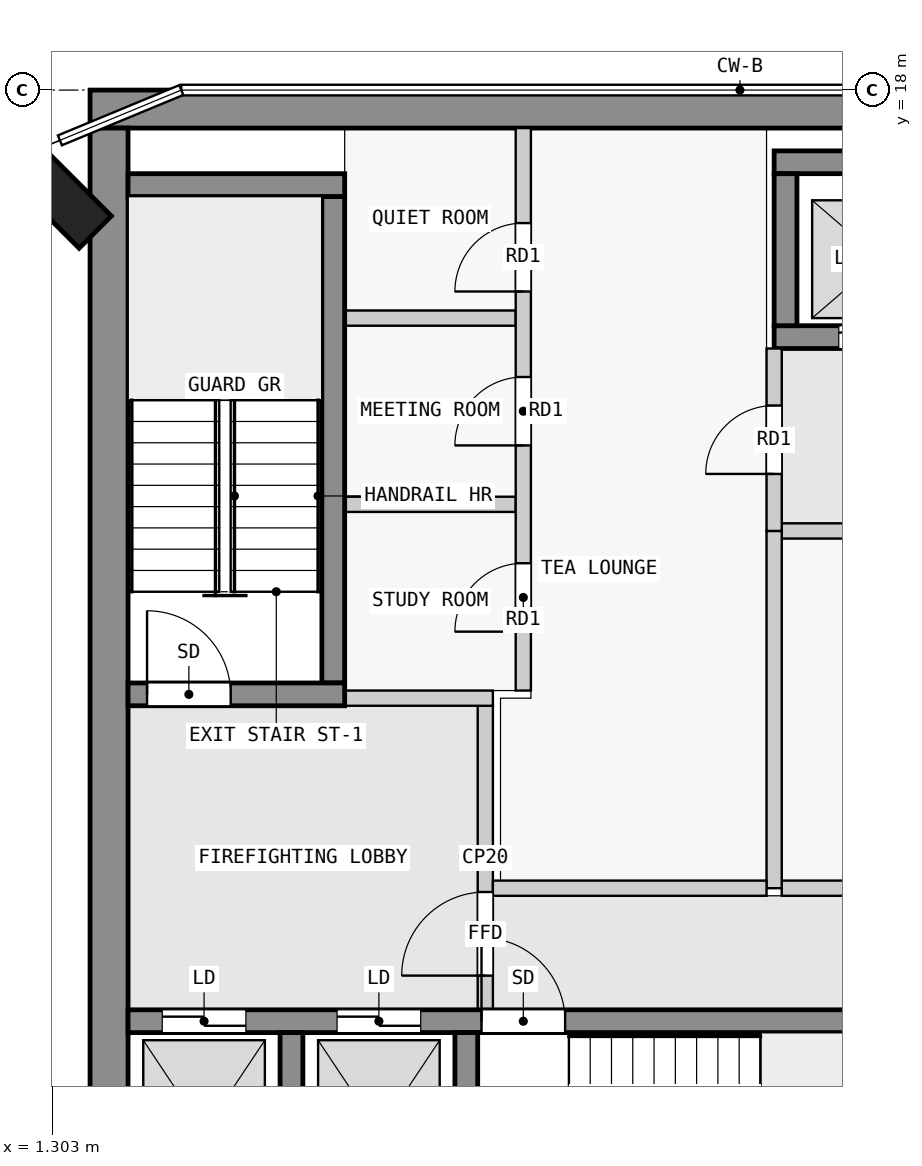
"""IFC4 building model, lengths in metres.
Left out: names, types, materials, properties, quantities, classifications, styles, units other than length and angle.
Written with IfcOpenShell. Run it as: python <this file> out.ifc"""

import sys

from ifc_helpers import new_model, si_unit, direction, frame, frame_2d, origin, origin_2d, place, context, subcontext, project, spatial, rectangle, extrude, element, fill, save


model = new_model("IFC4")
c1 = context("Model", 3, precision=1e-05, world=origin(), true_north=direction((0.0, 1.0)))
c2 = subcontext(c1, "Body", "Model", "MODEL_VIEW")
j1 = project(units=[si_unit("LENGTHUNIT", "METRE"), si_unit("PLANEANGLEUNIT", "RADIAN")], contexts=[c1])
p1 = place(None, origin())
s1 = spatial("IfcSite", under=j1, at=p1, CompositionType="ELEMENT")
p2 = place(p1, origin())
s2 = spatial("IfcBuilding", under=s1, at=p2, CompositionType="ELEMENT")
p3 = place(p2, frame((0.0, 0.0, 242.4)))
s3 = spatial("IfcBuildingStorey", under=s2, at=p3, CompositionType="ELEMENT", Elevation=242.4)
p4 = place(p3, frame((1.374, 16.626, 0.0), z_axis=(0.0, 0.0, 1.0), x_axis=(0.707106781187, 0.707106781187, 0.0)))
e1 = element("IfcColumn", 1, at=p4, inside=s3, PredefinedType="COLUMN", context=c2, shape_type="SweptSolid", body=[
    extrude(rectangle(XDim=0.6, YDim=1.4, at=origin_2d()), origin(), (0.0, 0.0, 1.0), 3.5),
])
p5 = place(p3, frame((1.8, 17.75, 0.0), z_axis=(0.0, 0.0, 1.0), x_axis=(1.0, 0.0, 0.0)))
e2 = element("IfcWall", 2, at=p5, inside=s3, PredefinedType="SHEAR", context=c2, shape_type="SweptSolid", body=[
    extrude(rectangle(XDim=20.7, YDim=0.5, at=frame_2d((10.35, 0.0))), origin(), (0.0, 0.0, 1.0), 3.25),
])
p6 = place(p3, frame((2.05, 2.5, 0.0), z_axis=(0.0, 0.0, 1.0), x_axis=(0.0, 1.0, 0.0)))
e3 = element("IfcWall", 3, at=p6, inside=s3, PredefinedType="SHEAR", context=c2, shape_type="SweptSolid", body=[
    extrude(rectangle(XDim=15.0, YDim=0.5, at=frame_2d((7.5, 0.0))), origin(), (0.0, 0.0, 1.0), 3.25),
])
for number, where, z_axis, x_axis in (
    (4, (4.45, 2.8, 0.0), (0.0, 0.0, 1.0), (0.0, 1.0, 0.0)),
    (5, (6.75, 2.8, 0.0), (0.0, 0.0, 1.0), (0.0, 1.0, 0.0)),
):
    element("IfcWall", number, at=place(p3, frame(where, z_axis=z_axis, x_axis=x_axis)), inside=s3, PredefinedType="SHEAR", context=c2, shape_type="SweptSolid", body=[
        extrude(rectangle(XDim=2.8, YDim=0.3, at=frame_2d((1.4, 0.0))), origin(), (0.0, 0.0, 1.0), 3.25),
    ])
p7 = place(p3, frame((2.3, 5.75, 0.0), z_axis=(0.0, 0.0, 1.0), x_axis=(1.0, 0.0, 0.0)))
e6 = element("IfcWall", 6, at=p7, inside=s3, PredefinedType="SHEAR", context=c2, shape_type="SweptSolid", body=[
    extrude(rectangle(XDim=18.8, YDim=0.3, at=frame_2d((9.4, 0.0))), origin(), (0.0, 0.0, 1.0), 3.25),
])
p8 = place(p7, frame((4.65, 0.0, 0.0)))
e7 = element("IfcOpeningElement", 7, at=p8, cuts=e6, PredefinedType="OPENING", context=c2, shape_type="SweptSolid", body=[
    extrude(rectangle(XDim=1.1, YDim=2.1, at=frame_2d((0.55, 1.05))), frame((0.0, 0.16, 0.0), z_axis=(0.0, -1.0, 0.0), x_axis=(1.0, 0.0, 0.0)), (0.0, 0.0, 1.0), 0.32),
])
p9 = place(p7, frame((0.45, 0.0, 0.0)))
e8 = element("IfcOpeningElement", 8, at=p9, cuts=e6, PredefinedType="OPENING", context=c2, shape_type="SweptSolid", body=[
    extrude(rectangle(XDim=1.1, YDim=2.1, at=frame_2d((0.55, 1.05))), frame((0.0, 0.16, 0.0), z_axis=(0.0, -1.0, 0.0), x_axis=(1.0, 0.0, 0.0)), (0.0, 0.0, 1.0), 0.32),
])
p10 = place(p7, frame((2.75, 0.0, 0.0)))
e9 = element("IfcOpeningElement", 9, at=p10, cuts=e6, PredefinedType="OPENING", context=c2, shape_type="SweptSolid", body=[
    extrude(rectangle(XDim=1.1, YDim=2.1, at=frame_2d((0.55, 1.05))), frame((0.0, 0.16, 0.0), z_axis=(0.0, -1.0, 0.0), x_axis=(1.0, 0.0, 0.0)), (0.0, 0.0, 1.0), 0.32),
])
p11 = place(p7, frame((13.2, 0.0, 0.0)))
e10 = element("IfcOpeningElement", 10, at=p11, cuts=e6, PredefinedType="OPENING", context=c2, shape_type="SweptSolid", body=[
    extrude(rectangle(XDim=0.9, YDim=2.1, at=frame_2d((0.45, 1.05))), frame((0.0, 0.16, 0.0), z_axis=(0.0, -1.0, 0.0), x_axis=(1.0, 0.0, 0.0)), (0.0, 0.0, 1.0), 0.32),
])
p12 = place(p7, frame((16.95, 0.0, 0.0)))
e11 = element("IfcOpeningElement", 11, at=p12, cuts=e6, PredefinedType="OPENING", context=c2, shape_type="SweptSolid", body=[
    extrude(rectangle(XDim=0.9, YDim=2.1, at=frame_2d((0.45, 1.05))), frame((0.0, 0.16, 0.0), z_axis=(0.0, -1.0, 0.0), x_axis=(1.0, 0.0, 0.0)), (0.0, 0.0, 1.0), 0.32),
])
p13 = place(p3, frame((2.3, 10.05, 0.0), z_axis=(0.0, 0.0, 1.0), x_axis=(1.0, 0.0, 0.0)))
e12 = element("IfcWall", 12, at=p13, inside=s3, PredefinedType="SHEAR", context=c2, shape_type="SweptSolid", body=[
    extrude(rectangle(XDim=2.85, YDim=0.3, at=frame_2d((1.425, 0.0))), origin(), (0.0, 0.0, 1.0), 3.25),
])
p14 = place(p13, frame((0.25, 0.0, 0.0)))
e13 = element("IfcOpeningElement", 13, at=p14, cuts=e12, PredefinedType="OPENING", context=c2, shape_type="SweptSolid", body=[
    extrude(rectangle(XDim=1.1, YDim=2.1, at=frame_2d((0.55, 1.05))), frame((0.0, 0.16, 0.0), z_axis=(0.0, -1.0, 0.0), x_axis=(1.0, 0.0, 0.0)), (0.0, 0.0, 1.0), 0.32),
])
p15 = place(p3, frame((5.0, 10.2, 0.0), z_axis=(0.0, 0.0, 1.0), x_axis=(0.0, 1.0, 0.0)))
e14 = element("IfcWall", 14, at=p15, inside=s3, PredefinedType="SHEAR", context=c2, shape_type="SweptSolid", body=[
    extrude(rectangle(XDim=6.4, YDim=0.3, at=frame_2d((3.2, 0.0))), origin(), (0.0, 0.0, 1.0), 3.25),
])
p16 = place(p3, frame((2.3, 16.75, 0.0), z_axis=(0.0, 0.0, 1.0), x_axis=(1.0, 0.0, 0.0)))
e15 = element("IfcWall", 15, at=p16, inside=s3, PredefinedType="SHEAR", context=c2, shape_type="SweptSolid", body=[
    extrude(rectangle(XDim=2.85, YDim=0.3, at=frame_2d((1.425, 0.0))), origin(), (0.0, 0.0, 1.0), 3.25),
])
p17 = place(p3, frame((10.8, 17.05, 0.0), z_axis=(0.0, 0.0, 1.0), x_axis=(1.0, 0.0, 0.0)))
e16 = element("IfcWall", 16, at=p17, inside=s3, PredefinedType="SHEAR", context=c2, shape_type="SweptSolid", body=[
    extrude(rectangle(XDim=7.8, YDim=0.3, at=frame_2d((3.9, 0.0))), origin(), (0.0, 0.0, 1.0), 3.25),
])
p18 = place(p3, frame((10.8, 14.75, 0.0), z_axis=(0.0, 0.0, 1.0), x_axis=(1.0, 0.0, 0.0)))
e17 = element("IfcWall", 17, at=p18, inside=s3, PredefinedType="SHEAR", context=c2, shape_type="SweptSolid", body=[
    extrude(rectangle(XDim=7.8, YDim=0.3, at=frame_2d((3.9, 0.0))), origin(), (0.0, 0.0, 1.0), 3.25),
])
p19 = place(p18, frame((0.85, 0.0, 0.0)))
e18 = element("IfcOpeningElement", 18, at=p19, cuts=e17, PredefinedType="OPENING", context=c2, shape_type="SweptSolid", body=[
    extrude(rectangle(XDim=1.1, YDim=2.1, at=frame_2d((0.55, 1.05))), frame((0.0, 0.16, 0.0), z_axis=(0.0, -1.0, 0.0), x_axis=(1.0, 0.0, 0.0)), (0.0, 0.0, 1.0), 0.32),
])
p20 = place(p18, frame((3.35, 0.0, 0.0)))
e19 = element("IfcOpeningElement", 19, at=p20, cuts=e17, PredefinedType="OPENING", context=c2, shape_type="SweptSolid", body=[
    extrude(rectangle(XDim=1.1, YDim=2.1, at=frame_2d((0.55, 1.05))), frame((0.0, 0.16, 0.0), z_axis=(0.0, -1.0, 0.0), x_axis=(1.0, 0.0, 0.0)), (0.0, 0.0, 1.0), 0.32),
])
p21 = place(p18, frame((5.85, 0.0, 0.0)))
e20 = element("IfcOpeningElement", 20, at=p21, cuts=e17, PredefinedType="OPENING", context=c2, shape_type="SweptSolid", body=[
    extrude(rectangle(XDim=1.1, YDim=2.1, at=frame_2d((0.55, 1.05))), frame((0.0, 0.16, 0.0), z_axis=(0.0, -1.0, 0.0), x_axis=(1.0, 0.0, 0.0)), (0.0, 0.0, 1.0), 0.32),
])
p22 = place(p3, frame((10.95, 14.9, 0.0), z_axis=(0.0, 0.0, 1.0), x_axis=(0.0, 1.0, 0.0)))
e21 = element("IfcWall", 21, at=p22, inside=s3, PredefinedType="SHEAR", context=c2, shape_type="SweptSolid", body=[
    extrude(rectangle(XDim=2.0, YDim=0.3, at=frame_2d((1.0, 0.0))), origin(), (0.0, 0.0, 1.0), 3.25),
])
p23 = place(p3, frame((7.0, 5.9, 0.0), z_axis=(0.0, 0.0, 1.0), x_axis=(0.0, 1.0, 0.0)))
e22 = element("IfcWall", 22, at=p23, inside=s3, PredefinedType="PARTITIONING", context=c2, shape_type="SweptSolid", body=[
    extrude(rectangle(XDim=4.0, YDim=0.2, at=frame_2d((2.0, 0.0))), origin(), (0.0, 0.0, 1.0), 3.25),
])
p24 = place(p23, frame((0.45, 0.0, 0.0)))
e23 = element("IfcOpeningElement", 23, at=p24, cuts=e22, PredefinedType="OPENING", context=c2, shape_type="SweptSolid", body=[
    extrude(rectangle(XDim=1.1, YDim=2.1, at=frame_2d((0.55, 1.05))), frame((0.0, 0.11, 0.0), z_axis=(0.0, -1.0, 0.0), x_axis=(1.0, 0.0, 0.0)), (0.0, 0.0, 1.0), 0.22),
])
p25 = place(p3, frame((5.15, 10.0, 0.0), z_axis=(0.0, 0.0, 1.0), x_axis=(1.0, 0.0, 0.0)))
e24 = element("IfcWall", 24, at=p25, inside=s3, PredefinedType="PARTITIONING", context=c2, shape_type="SweptSolid", body=[
    extrude(rectangle(XDim=1.95, YDim=0.2, at=frame_2d((0.975, 0.0))), origin(), (0.0, 0.0, 1.0), 3.25),
])
p26 = place(p3, frame((7.1, 7.5, 0.0), z_axis=(0.0, 0.0, 1.0), x_axis=(1.0, 0.0, 0.0)))
e25 = element("IfcWall", 25, at=p26, inside=s3, PredefinedType="PARTITIONING", context=c2, shape_type="SweptSolid", body=[
    extrude(rectangle(XDim=3.6, YDim=0.2, at=frame_2d((1.8, 0.0))), origin(), (0.0, 0.0, 1.0), 3.25),
])
p27 = place(p3, frame((10.8, 12.2, 0.0), z_axis=(0.0, 0.0, 1.0), x_axis=(0.0, 1.0, 0.0)))
e26 = element("IfcWall", 26, at=p27, inside=s3, PredefinedType="PARTITIONING", context=c2, shape_type="SweptSolid", body=[
    extrude(rectangle(XDim=2.4, YDim=0.2, at=frame_2d((1.2, 0.0))), origin(), (0.0, 0.0, 1.0), 3.25),
])
p28 = place(p27, frame((0.75, 0.0, 0.0)))
e27 = element("IfcOpeningElement", 27, at=p28, cuts=e26, PredefinedType="OPENING", context=c2, shape_type="SweptSolid", body=[
    extrude(rectangle(XDim=0.9, YDim=2.1, at=frame_2d((0.45, 1.05))), frame((0.0, 0.11, 0.0), z_axis=(0.0, -1.0, 0.0), x_axis=(1.0, 0.0, 0.0)), (0.0, 0.0, 1.0), 0.22),
])
p29 = place(p3, frame((10.8, 7.5, 0.0), z_axis=(0.0, 0.0, 1.0), x_axis=(0.0, 1.0, 0.0)))
e28 = element("IfcWall", 28, at=p29, inside=s3, PredefinedType="PARTITIONING", context=c2, shape_type="SweptSolid", body=[
    extrude(rectangle(XDim=4.7, YDim=0.2, at=frame_2d((2.35, 0.0))), origin(), (0.0, 0.0, 1.0), 3.25),
])
p30 = place(p3, frame((10.9, 7.5, 0.0), z_axis=(0.0, 0.0, 1.0), x_axis=(1.0, 0.0, 0.0)))
e29 = element("IfcWall", 29, at=p30, inside=s3, PredefinedType="PARTITIONING", context=c2, shape_type="SweptSolid", body=[
    extrude(rectangle(XDim=8.6, YDim=0.2, at=frame_2d((4.3, 0.0))), origin(), (0.0, 0.0, 1.0), 3.25),
])
p31 = place(p3, frame((10.9, 12.2, 0.0), z_axis=(0.0, 0.0, 1.0), x_axis=(1.0, 0.0, 0.0)))
e30 = element("IfcWall", 30, at=p31, inside=s3, PredefinedType="PARTITIONING", context=c2, shape_type="SweptSolid", body=[
    extrude(rectangle(XDim=8.6, YDim=0.2, at=frame_2d((4.3, 0.0))), origin(), (0.0, 0.0, 1.0), 3.25),
])
p32 = place(p31, frame((3.85, 0.0, 0.0)))
e31 = element("IfcOpeningElement", 31, at=p32, cuts=e30, PredefinedType="OPENING", context=c2, shape_type="SweptSolid", body=[
    extrude(rectangle(XDim=0.9, YDim=2.1, at=frame_2d((0.45, 1.05))), frame((0.0, 0.11, 0.0), z_axis=(0.0, -1.0, 0.0), x_axis=(1.0, 0.0, 0.0)), (0.0, 0.0, 1.0), 0.22),
])
p33 = place(p3, frame((7.5, 10.1, 0.0), z_axis=(0.0, 0.0, 1.0), x_axis=(0.0, 1.0, 0.0)))
e32 = element("IfcWall", 32, at=p33, inside=s3, PredefinedType="PARTITIONING", context=c2, shape_type="SweptSolid", body=[
    extrude(rectangle(XDim=7.4, YDim=0.2, at=frame_2d((3.7, 0.0))), origin(), (0.0, 0.0, 1.0), 3.25),
])
p34 = place(p33, frame((0.775, 0.0, 0.0)))
e33 = element("IfcOpeningElement", 33, at=p34, cuts=e32, PredefinedType="OPENING", context=c2, shape_type="SweptSolid", body=[
    extrude(rectangle(XDim=0.9, YDim=2.1, at=frame_2d((0.45, 1.05))), frame((0.0, 0.11, 0.0), z_axis=(0.0, -1.0, 0.0), x_axis=(1.0, 0.0, 0.0)), (0.0, 0.0, 1.0), 0.22),
])
p35 = place(p33, frame((3.225, 0.0, 0.0)))
e34 = element("IfcOpeningElement", 34, at=p35, cuts=e32, PredefinedType="OPENING", context=c2, shape_type="SweptSolid", body=[
    extrude(rectangle(XDim=0.9, YDim=2.1, at=frame_2d((0.45, 1.05))), frame((0.0, 0.11, 0.0), z_axis=(0.0, -1.0, 0.0), x_axis=(1.0, 0.0, 0.0)), (0.0, 0.0, 1.0), 0.22),
])
p36 = place(p33, frame((5.25, 0.0, 0.0)))
e35 = element("IfcOpeningElement", 35, at=p36, cuts=e32, PredefinedType="OPENING", context=c2, shape_type="SweptSolid", body=[
    extrude(rectangle(XDim=0.9, YDim=2.1, at=frame_2d((0.45, 1.05))), frame((0.0, 0.11, 0.0), z_axis=(0.0, -1.0, 0.0), x_axis=(1.0, 0.0, 0.0)), (0.0, 0.0, 1.0), 0.22),
])
for number, where, z_axis, x_axis in (
    (36, (5.15, 12.55, 0.0), (0.0, 0.0, 1.0), (1.0, 0.0, 0.0)),
    (37, (5.15, 15.0, 0.0), (0.0, 0.0, 1.0), (1.0, 0.0, 0.0)),
):
    element("IfcWall", number, at=place(p3, frame(where, z_axis=z_axis, x_axis=x_axis)), inside=s3, PredefinedType="PARTITIONING", context=c2, shape_type="SweptSolid", body=[
        extrude(rectangle(XDim=2.25, YDim=0.2, at=frame_2d((1.125, 0.0))), origin(), (0.0, 0.0, 1.0), 3.25),
    ])
p37 = place(p24, origin())
e38 = element("IfcDoor", 38, at=p37, inside=s3, OperationType="SINGLE_SWING_LEFT", PredefinedType="DOOR", context=c2, shape_type="SweptSolid", body=[
    extrude(rectangle(XDim=1.1, YDim=2.1, at=frame_2d((0.55, 1.05))), frame((0.0, 0.025, 0.0), z_axis=(0.0, -1.0, 0.0), x_axis=(1.0, 0.0, 0.0)), (0.0, 0.0, 1.0), 0.05),
])
fill(e23, e38)
p38 = place(p14, origin())
e39 = element("IfcDoor", 39, at=p38, inside=s3, OperationType="SINGLE_SWING_RIGHT", PredefinedType="DOOR", context=c2, shape_type="SweptSolid", body=[
    extrude(rectangle(XDim=1.1, YDim=2.1, at=frame_2d((0.55, 1.05))), frame((0.0, 0.025, 0.0), z_axis=(0.0, -1.0, 0.0), x_axis=(1.0, 0.0, 0.0)), (0.0, 0.0, 1.0), 0.05),
])
fill(e13, e39)
p39 = place(p28, origin())
e40 = element("IfcDoor", 40, at=p39, inside=s3, OperationType="SINGLE_SWING_LEFT", PredefinedType="DOOR", context=c2, shape_type="SweptSolid", body=[
    extrude(rectangle(XDim=0.9, YDim=2.1, at=frame_2d((0.45, 1.05))), frame((0.0, 0.025, 0.0), z_axis=(0.0, -1.0, 0.0), x_axis=(1.0, 0.0, 0.0)), (0.0, 0.0, 1.0), 0.05),
])
fill(e27, e40)
p40 = place(p8, origin())
e41 = element("IfcDoor", 41, at=p40, inside=s3, OperationType="SINGLE_SWING_LEFT", PredefinedType="DOOR", context=c2, shape_type="SweptSolid", body=[
    extrude(rectangle(XDim=1.1, YDim=2.1, at=frame_2d((0.55, 1.05))), frame((0.0, 0.025, 0.0), z_axis=(0.0, -1.0, 0.0), x_axis=(1.0, 0.0, 0.0)), (0.0, 0.0, 1.0), 0.05),
])
fill(e7, e41)
p41 = place(p9, origin())
e42 = element("IfcDoor", 42, at=p41, inside=s3, OperationType="DOUBLE_DOOR_SLIDING", PredefinedType="DOOR", context=c2, shape_type="SweptSolid", body=[
    extrude(rectangle(XDim=1.1, YDim=2.1, at=frame_2d((0.55, 1.05))), frame((0.0, 0.025, 0.0), z_axis=(0.0, -1.0, 0.0), x_axis=(1.0, 0.0, 0.0)), (0.0, 0.0, 1.0), 0.05),
])
fill(e8, e42)
p42 = place(p10, origin())
e43 = element("IfcDoor", 43, at=p42, inside=s3, OperationType="DOUBLE_DOOR_SLIDING", PredefinedType="DOOR", context=c2, shape_type="SweptSolid", body=[
    extrude(rectangle(XDim=1.1, YDim=2.1, at=frame_2d((0.55, 1.05))), frame((0.0, 0.025, 0.0), z_axis=(0.0, -1.0, 0.0), x_axis=(1.0, 0.0, 0.0)), (0.0, 0.0, 1.0), 0.05),
])
fill(e9, e43)
p43 = place(p19, origin())
e44 = element("IfcDoor", 44, at=p43, inside=s3, OperationType="DOUBLE_DOOR_SLIDING", PredefinedType="DOOR", context=c2, shape_type="SweptSolid", body=[
    extrude(rectangle(XDim=1.1, YDim=2.1, at=frame_2d((0.55, 1.05))), frame((0.0, 0.025, 0.0), z_axis=(0.0, -1.0, 0.0), x_axis=(1.0, 0.0, 0.0)), (0.0, 0.0, 1.0), 0.05),
])
fill(e18, e44)
p44 = place(p34, origin())
e45 = element("IfcDoor", 45, at=p44, inside=s3, OperationType="SINGLE_SWING_RIGHT", PredefinedType="DOOR", context=c2, shape_type="SweptSolid", body=[
    extrude(rectangle(XDim=0.9, YDim=2.1, at=frame_2d((0.45, 1.05))), frame((0.0, 0.025, 0.0), z_axis=(0.0, -1.0, 0.0), x_axis=(1.0, 0.0, 0.0)), (0.0, 0.0, 1.0), 0.05),
])
fill(e33, e45)
p45 = place(p35, origin())
e46 = element("IfcDoor", 46, at=p45, inside=s3, OperationType="SINGLE_SWING_RIGHT", PredefinedType="DOOR", context=c2, shape_type="SweptSolid", body=[
    extrude(rectangle(XDim=0.9, YDim=2.1, at=frame_2d((0.45, 1.05))), frame((0.0, 0.025, 0.0), z_axis=(0.0, -1.0, 0.0), x_axis=(1.0, 0.0, 0.0)), (0.0, 0.0, 1.0), 0.05),
])
fill(e34, e46)
p46 = place(p36, origin())
e47 = element("IfcDoor", 47, at=p46, inside=s3, OperationType="SINGLE_SWING_RIGHT", PredefinedType="DOOR", context=c2, shape_type="SweptSolid", body=[
    extrude(rectangle(XDim=0.9, YDim=2.1, at=frame_2d((0.45, 1.05))), frame((0.0, 0.025, 0.0), z_axis=(0.0, -1.0, 0.0), x_axis=(1.0, 0.0, 0.0)), (0.0, 0.0, 1.0), 0.05),
])
fill(e35, e47)
save(model, sys.argv[1])
